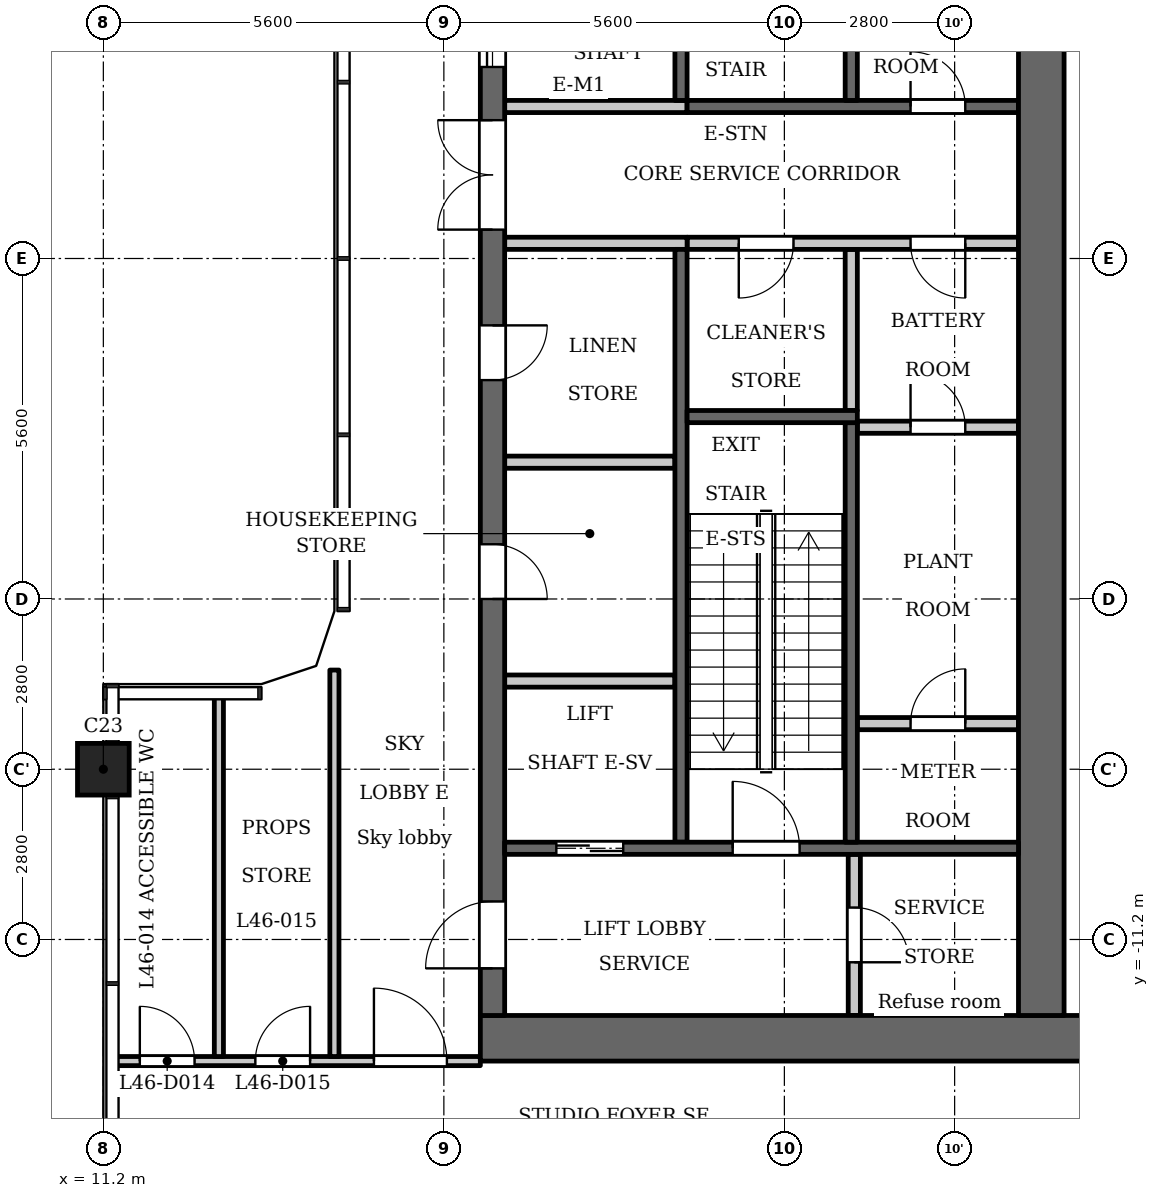
"""IFC4 building model, lengths in metres.
Left out: names, types, materials, properties, quantities, classifications, styles, units other than length and angle.
Written with IfcOpenShell. Run it as: python <this file> out.ifc"""

import sys

from ifc_helpers import new_model, si_unit, direction, frame, frame_2d, origin, origin_2d, place, context, subcontext, project, spatial, polyline, rectangle, outline, extrude, element, fill, save


model = new_model("IFC4")
c1 = context("Model", 3, precision=1e-05, world=origin(), true_north=direction((0.0, 1.0)))
c2 = subcontext(c1, "Body", "Model", "MODEL_VIEW")
j1 = project(units=[si_unit("LENGTHUNIT", "METRE"), si_unit("PLANEANGLEUNIT", "RADIAN")], contexts=[c1])
p1 = place(None, origin())
s1 = spatial("IfcSite", under=j1, at=p1, CompositionType="ELEMENT")
p2 = place(p1, origin())
s2 = spatial("IfcBuilding", under=s1, at=p2, CompositionType="ELEMENT")
p3 = place(p2, frame((0.0, 0.0, 178.1)))
s3 = spatial("IfcBuildingStorey", under=s2, at=p3, CompositionType="ELEMENT", Elevation=178.1)
p4 = place(p3, frame((11.2, -8.4, 0.0), z_axis=(0.0, 0.0, 1.0), x_axis=(1.0, 0.0, 0.0)))
e1 = element("IfcColumn", 1, at=p4, inside=s3, PredefinedType="COLUMN", context=c2, shape_type="SweptSolid", body=[
    extrude(rectangle(XDim=0.85, YDim=0.85, at=origin_2d()), origin(), (0.0, 0.0, 1.0), 5.4),
])
p5 = place(p3, frame((23.5, -2.5, 0.0), z_axis=(0.0, 0.0, 1.0), x_axis=(0.0, 1.0, 0.0)))
e2 = element("IfcWall", 2, at=p5, inside=s3, PredefinedType="PARTITIONING", context=c2, shape_type="SweptSolid", body=[
    extrude(rectangle(XDim=2.65, YDim=0.2, at=frame_2d((1.325, 0.0))), origin(), (0.0, 0.0, 1.0), 4.95),
])
p6 = place(p3, frame((20.7, 2.6, 0.0), z_axis=(0.0, 0.0, 1.0), x_axis=(0.0, 1.0, 0.0)))
e3 = element("IfcWall", 3, at=p6, inside=s3, PredefinedType="SHEAR", context=c2, shape_type="SweptSolid", body=[
    extrude(rectangle(XDim=7.0, YDim=0.2, at=frame_2d((3.5, 0.0))), origin(), (0.0, 0.0, 1.0), 4.95),
])
p7 = place(p3, frame((20.7, -9.6, 0.0), z_axis=(0.0, 0.0, 1.0), x_axis=(0.0, 1.0, 0.0)))
e4 = element("IfcWall", 4, at=p7, inside=s3, PredefinedType="SHEAR", context=c2, shape_type="SweptSolid", body=[
    extrude(rectangle(XDim=9.75, YDim=0.2, at=frame_2d((4.875, 0.0))), origin(), (0.0, 0.0, 1.0), 4.95),
])
p8 = place(p3, frame((20.8, 2.5, 0.0), z_axis=(0.0, 0.0, 1.0), x_axis=(1.0, 0.0, 0.0)))
e5 = element("IfcWall", 5, at=p8, inside=s3, PredefinedType="SHEAR", context=c2, shape_type="SweptSolid", body=[
    extrude(rectangle(XDim=5.45, YDim=0.2, at=frame_2d((2.725, 0.0))), origin(), (0.0, 0.0, 1.0), 4.95),
])
p9 = place(p8, frame((3.675, 0.0, 0.0)))
e6 = element("IfcOpeningElement", 6, at=p9, cuts=e5, PredefinedType="OPENING", context=c2, shape_type="SweptSolid", body=[
    extrude(rectangle(XDim=0.9, YDim=2.1, at=frame_2d((0.45, 1.05))), frame((0.0, 0.11, 0.0), z_axis=(0.0, -1.0, 0.0), x_axis=(1.0, 0.0, 0.0)), (0.0, 0.0, 1.0), 0.22),
])
p10 = place(p3, frame((20.8, 0.25, 0.0), z_axis=(0.0, 0.0, 1.0), x_axis=(1.0, 0.0, 0.0)))
e7 = element("IfcWall", 7, at=p10, inside=s3, PredefinedType="PARTITIONING", context=c2, shape_type="SweptSolid", body=[
    extrude(rectangle(XDim=5.45, YDim=0.2, at=frame_2d((2.725, 0.0))), origin(), (0.0, 0.0, 1.0), 4.95),
])
p11 = place(p10, frame((0.85, 0.0, 0.0)))
e8 = element("IfcOpeningElement", 8, at=p11, cuts=e7, PredefinedType="OPENING", context=c2, shape_type="SweptSolid", body=[
    extrude(rectangle(XDim=0.9, YDim=2.1, at=frame_2d((0.45, 1.05))), frame((0.0, 0.11, 0.0), z_axis=(0.0, -1.0, 0.0), x_axis=(1.0, 0.0, 0.0)), (0.0, 0.0, 1.0), 0.22),
])
p12 = place(p10, frame((3.675, 0.0, 0.0)))
e9 = element("IfcOpeningElement", 9, at=p12, cuts=e7, PredefinedType="OPENING", context=c2, shape_type="SweptSolid", body=[
    extrude(rectangle(XDim=0.9, YDim=2.1, at=frame_2d((0.45, 1.05))), frame((0.0, 0.11, 0.0), z_axis=(0.0, -1.0, 0.0), x_axis=(1.0, 0.0, 0.0)), (0.0, 0.0, 1.0), 0.22),
])
p13 = place(p3, frame((17.4, -12.825, 0.0), z_axis=(0.0, 0.0, 1.0), x_axis=(1.0, 0.0, 0.0)))
e10 = element("IfcWall", 10, at=p13, inside=s3, PredefinedType="SHEAR", context=c2, shape_type="SweptSolid", body=[
    extrude(rectangle(XDim=10.4, YDim=0.75, at=frame_2d((5.2, 0.0))), origin(), (0.0, 0.0, 1.0), 4.95),
])
p14 = place(p3, frame((17.8, -3.35, 0.0), z_axis=(0.0, 0.0, 1.0), x_axis=(1.0, 0.0, 0.0)))
e11 = element("IfcWall", 11, at=p14, inside=s3, PredefinedType="PARTITIONING", context=c2, shape_type="SweptSolid", body=[
    extrude(rectangle(XDim=2.8, YDim=0.2, at=frame_2d((1.4, 0.0))), origin(), (0.0, 0.0, 1.0), 4.95),
])
p15 = place(p3, frame((17.6, -12.45, 0.0), z_axis=(0.0, 0.0, 1.0), x_axis=(0.0, 1.0, 0.0)))
e12 = element("IfcWall", 12, at=p15, inside=s3, PredefinedType="SHEAR", context=c2, shape_type="SweptSolid", body=[
    extrude(rectangle(XDim=24.9, YDim=0.4, at=frame_2d((12.45, 0.0))), origin(), (0.0, 0.0, 1.0), 4.95),
])
p16 = place(p15, frame((6.85, 0.0, 0.0)))
e13 = element("IfcOpeningElement", 13, at=p16, cuts=e12, PredefinedType="OPENING", context=c2, shape_type="SweptSolid", body=[
    extrude(rectangle(XDim=0.9, YDim=2.1, at=frame_2d((0.45, 1.05))), frame((0.0, 0.21, 0.0), z_axis=(0.0, -1.0, 0.0), x_axis=(1.0, 0.0, 0.0)), (0.0, 0.0, 1.0), 0.42),
])
p17 = place(p15, frame((10.45, 0.0, 0.0)))
e14 = element("IfcOpeningElement", 14, at=p17, cuts=e12, PredefinedType="OPENING", context=c2, shape_type="SweptSolid", body=[
    extrude(rectangle(XDim=0.9, YDim=2.1, at=frame_2d((0.45, 1.05))), frame((0.0, 0.21, 0.0), z_axis=(0.0, -1.0, 0.0), x_axis=(1.0, 0.0, 0.0)), (0.0, 0.0, 1.0), 0.42),
])
p18 = place(p15, frame((15.6, 0.0, 0.0)))
e15 = element("IfcOpeningElement", 15, at=p18, cuts=e12, PredefinedType="OPENING", context=c2, shape_type="SweptSolid", body=[
    extrude(rectangle(XDim=1.1, YDim=2.1, at=frame_2d((0.55, 1.05))), frame((0.0, 0.21, 0.0), z_axis=(0.0, -1.0, 0.0), x_axis=(1.0, 0.0, 0.0)), (0.0, 0.0, 1.0), 0.42),
])
p19 = place(p15, frame((18.0, 0.0, 0.0)))
e16 = element("IfcOpeningElement", 16, at=p19, cuts=e12, PredefinedType="OPENING", context=c2, shape_type="SweptSolid", body=[
    extrude(rectangle(XDim=1.1, YDim=2.1, at=frame_2d((0.55, 1.05))), frame((0.0, 0.21, 0.0), z_axis=(0.0, -1.0, 0.0), x_axis=(1.0, 0.0, 0.0)), (0.0, 0.0, 1.0), 0.42),
])
p20 = place(p15, frame((23.025, 0.0, 0.0)))
e17 = element("IfcOpeningElement", 17, at=p20, cuts=e12, PredefinedType="OPENING", context=c2, shape_type="SweptSolid", body=[
    extrude(rectangle(XDim=1.1, YDim=2.1, at=frame_2d((0.55, 1.05))), frame((0.0, 0.21, 0.0), z_axis=(0.0, -1.0, 0.0), x_axis=(1.0, 0.0, 0.0)), (0.0, 0.0, 1.0), 0.42),
])
p21 = place(p15, frame((0.775, 0.0, 0.0)))
e18 = element("IfcOpeningElement", 18, at=p21, cuts=e12, PredefinedType="OPENING", context=c2, shape_type="SweptSolid", body=[
    extrude(rectangle(XDim=1.1, YDim=2.1, at=frame_2d((0.55, 1.05))), frame((0.0, 0.21, 0.0), z_axis=(0.0, -1.0, 0.0), x_axis=(1.0, 0.0, 0.0)), (0.0, 0.0, 1.0), 0.42),
])
p22 = place(p15, frame((12.925, 0.0, 0.0)))
e19 = element("IfcOpeningElement", 19, at=p22, cuts=e12, PredefinedType="OPENING", context=c2, shape_type="SweptSolid", body=[
    extrude(rectangle(XDim=1.8, YDim=2.1, at=frame_2d((0.9, 1.05))), frame((0.0, 0.21, 0.0), z_axis=(0.0, -1.0, 0.0), x_axis=(1.0, 0.0, 0.0)), (0.0, 0.0, 1.0), 0.42),
])
p23 = place(p3, frame((26.625, -12.45, 0.0), z_axis=(0.0, 0.0, 1.0), x_axis=(0.0, 1.0, 0.0)))
e20 = element("IfcWall", 20, at=p23, inside=s3, PredefinedType="SHEAR", context=c2, shape_type="SweptSolid", body=[
    extrude(rectangle(XDim=24.9, YDim=0.75, at=frame_2d((12.45, 0.0))), origin(), (0.0, 0.0, 1.0), 4.95),
])
p24 = place(p3, frame((23.55, -12.45, 0.0), z_axis=(0.0, 0.0, 1.0), x_axis=(0.0, 1.0, 0.0)))
e21 = element("IfcWall", 21, at=p24, inside=s3, PredefinedType="PARTITIONING", context=c2, shape_type="SweptSolid", body=[
    extrude(rectangle(XDim=2.65, YDim=0.2, at=frame_2d((1.325, 0.0))), origin(), (0.0, 0.0, 1.0), 4.95),
])
p25 = place(p24, frame((0.875, 0.0, 0.0)))
e22 = element("IfcOpeningElement", 22, at=p25, cuts=e21, PredefinedType="OPENING", context=c2, shape_type="SweptSolid", body=[
    extrude(rectangle(XDim=0.9, YDim=2.1, at=frame_2d((0.45, 1.05))), frame((0.0, 0.11, 0.0), z_axis=(0.0, -1.0, 0.0), x_axis=(1.0, 0.0, 0.0)), (0.0, 0.0, 1.0), 0.22),
])
p26 = place(p3, frame((23.6, -7.65, 0.0), z_axis=(0.0, 0.0, 1.0), x_axis=(1.0, 0.0, 0.0)))
e23 = element("IfcWall", 23, at=p26, inside=s3, PredefinedType="PARTITIONING", context=c2, shape_type="SweptSolid", body=[
    extrude(rectangle(XDim=2.65, YDim=0.2, at=frame_2d((1.325, 0.0))), origin(), (0.0, 0.0, 1.0), 4.95),
])
p27 = place(p26, frame((0.875, 0.0, 0.0)))
e24 = element("IfcOpeningElement", 24, at=p27, cuts=e23, PredefinedType="OPENING", context=c2, shape_type="SweptSolid", body=[
    extrude(rectangle(XDim=0.9, YDim=2.1, at=frame_2d((0.45, 1.05))), frame((0.0, 0.11, 0.0), z_axis=(0.0, -1.0, 0.0), x_axis=(1.0, 0.0, 0.0)), (0.0, 0.0, 1.0), 0.22),
])
p28 = place(p3, frame((23.6, -2.775, 0.0), z_axis=(0.0, 0.0, 1.0), x_axis=(1.0, 0.0, 0.0)))
e25 = element("IfcWall", 25, at=p28, inside=s3, PredefinedType="PARTITIONING", context=c2, shape_type="SweptSolid", body=[
    extrude(rectangle(XDim=2.65, YDim=0.2, at=frame_2d((1.325, 0.0))), origin(), (0.0, 0.0, 1.0), 4.95),
])
p29 = place(p28, frame((0.875, 0.0, 0.0)))
e26 = element("IfcOpeningElement", 26, at=p29, cuts=e25, PredefinedType="OPENING", context=c2, shape_type="SweptSolid", body=[
    extrude(rectangle(XDim=0.9, YDim=2.1, at=frame_2d((0.45, 1.05))), frame((0.0, 0.11, 0.0), z_axis=(0.0, -1.0, 0.0), x_axis=(1.0, 0.0, 0.0)), (0.0, 0.0, 1.0), 0.22),
])
p30 = place(p3, frame((17.8, -9.7, 0.0), z_axis=(0.0, 0.0, 1.0), x_axis=(1.0, 0.0, 0.0)))
e27 = element("IfcWall", 27, at=p30, inside=s3, PredefinedType="SHEAR", context=c2, shape_type="SweptSolid", body=[
    extrude(rectangle(XDim=8.45, YDim=0.2, at=frame_2d((4.225, 0.0))), origin(), (0.0, 0.0, 1.0), 4.95),
])
p31 = place(p30, frame((0.85, 0.0, 0.0)))
e28 = element("IfcOpeningElement", 28, at=p31, cuts=e27, PredefinedType="OPENING", context=c2, shape_type="SweptSolid", body=[
    extrude(rectangle(XDim=1.1, YDim=2.1, at=frame_2d((0.55, 1.05))), frame((0.0, 0.11, 0.0), z_axis=(0.0, -1.0, 0.0), x_axis=(1.0, 0.0, 0.0)), (0.0, 0.0, 1.0), 0.22),
])
p32 = place(p30, frame((3.75, 0.0, 0.0)))
e29 = element("IfcOpeningElement", 29, at=p32, cuts=e27, PredefinedType="OPENING", context=c2, shape_type="SweptSolid", body=[
    extrude(rectangle(XDim=1.1, YDim=2.1, at=frame_2d((0.55, 1.05))), frame((0.0, 0.11, 0.0), z_axis=(0.0, -1.0, 0.0), x_axis=(1.0, 0.0, 0.0)), (0.0, 0.0, 1.0), 0.22),
])
p33 = place(p3, frame((17.8, -6.95, 0.0), z_axis=(0.0, 0.0, 1.0), x_axis=(1.0, 0.0, 0.0)))
e30 = element("IfcWall", 30, at=p33, inside=s3, PredefinedType="PARTITIONING", context=c2, shape_type="SweptSolid", body=[
    extrude(rectangle(XDim=2.8, YDim=0.2, at=frame_2d((1.4, 0.0))), origin(), (0.0, 0.0, 1.0), 4.95),
])
for number, where, z_axis, x_axis in (
    (31, (17.8, 0.25, 0.0), (0.0, 0.0, 1.0), (1.0, 0.0, 0.0)),
    (32, (17.8, 2.5, 0.0), (0.0, 0.0, 1.0), (1.0, 0.0, 0.0)),
):
    element("IfcWall", number, at=place(p3, frame(where, z_axis=z_axis, x_axis=x_axis)), inside=s3, PredefinedType="PARTITIONING", context=c2, shape_type="SweptSolid", body=[
        extrude(rectangle(XDim=3.0, YDim=0.2, at=frame_2d((1.5, 0.0))), origin(), (0.0, 0.0, 1.0), 4.95),
    ])
p34 = place(p3, frame((23.5, 2.6, 0.0), z_axis=(0.0, 0.0, 1.0), x_axis=(0.0, 1.0, 0.0)))
e33 = element("IfcWall", 33, at=p34, inside=s3, PredefinedType="SHEAR", context=c2, shape_type="SweptSolid", body=[
    extrude(rectangle(XDim=7.0, YDim=0.2, at=frame_2d((3.5, 0.0))), origin(), (0.0, 0.0, 1.0), 4.95),
])
p35 = place(p3, frame((23.5, -9.6, 0.0), z_axis=(0.0, 0.0, 1.0), x_axis=(0.0, 1.0, 0.0)))
e34 = element("IfcWall", 34, at=p35, inside=s3, PredefinedType="SHEAR", context=c2, shape_type="SweptSolid", body=[
    extrude(rectangle(XDim=6.9, YDim=0.2, at=frame_2d((3.45, 0.0))), origin(), (0.0, 0.0, 1.0), 4.95),
])
p36 = place(p3, frame((20.8, -2.6, 0.0), z_axis=(0.0, 0.0, 1.0), x_axis=(1.0, 0.0, 0.0)))
e35 = element("IfcWall", 35, at=p36, inside=s3, PredefinedType="SHEAR", context=c2, shape_type="SweptSolid", body=[
    extrude(rectangle(XDim=2.8, YDim=0.2, at=frame_2d((1.4, 0.0))), origin(), (0.0, 0.0, 1.0), 4.95),
])
p37 = place(p3, frame((11.384, -13.2, 0.0), z_axis=(0.0, 0.0, 1.0), x_axis=(1.0, 0.0, 0.0)))
e36 = element("IfcWall", 36, at=p37, inside=s3, PredefinedType="PARTITIONING", context=c2, shape_type="SweptSolid", body=[
    extrude(rectangle(XDim=6.016, YDim=0.15, at=frame_2d((3.008, 0.0))), origin(), (0.0, 0.0, 1.0), 4.95),
])
p38 = place(p37, frame((4.266, 0.0, 0.0)))
e37 = element("IfcOpeningElement", 37, at=p38, cuts=e36, PredefinedType="OPENING", context=c2, shape_type="SweptSolid", body=[
    extrude(rectangle(XDim=1.2, YDim=2.1, at=frame_2d((0.6, 1.05))), frame((0.0, 0.085, 0.0), z_axis=(0.0, -1.0, 0.0), x_axis=(1.0, 0.0, 0.0)), (0.0, 0.0, 1.0), 0.17),
])
p39 = place(p37, frame((0.416, 0.0, 0.0)))
e38 = element("IfcOpeningElement", 38, at=p39, cuts=e36, PredefinedType="OPENING", context=c2, shape_type="SweptSolid", body=[
    extrude(rectangle(XDim=0.9, YDim=2.1, at=frame_2d((0.45, 1.05))), frame((0.0, 0.085, 0.0), z_axis=(0.0, -1.0, 0.0), x_axis=(1.0, 0.0, 0.0)), (0.0, 0.0, 1.0), 0.17),
])
p40 = place(p37, frame((2.316, 0.0, 0.0)))
e39 = element("IfcOpeningElement", 39, at=p40, cuts=e36, PredefinedType="OPENING", context=c2, shape_type="SweptSolid", body=[
    extrude(rectangle(XDim=0.9, YDim=2.1, at=frame_2d((0.45, 1.05))), frame((0.0, 0.085, 0.0), z_axis=(0.0, -1.0, 0.0), x_axis=(1.0, 0.0, 0.0)), (0.0, 0.0, 1.0), 0.17),
])
p41 = place(p3, frame((13.1, -13.125, 0.0), z_axis=(0.0, 0.0, 1.0), x_axis=(0.0, 1.0, 0.0)))
e40 = element("IfcWall", 40, at=p41, inside=s3, PredefinedType="PARTITIONING", context=c2, shape_type="SweptSolid", body=[
    extrude(rectangle(XDim=5.941, YDim=0.15, at=frame_2d((2.97, 0.0))), origin(), (0.0, 0.0, 1.0), 4.95),
])
p42 = place(p3, frame((15.0, -13.125, 0.0), z_axis=(0.0, 0.0, 1.0), x_axis=(0.0, 1.0, 0.0)))
e41 = element("IfcWall", 41, at=p42, inside=s3, PredefinedType="PARTITIONING", context=c2, shape_type="SweptSolid", body=[
    extrude(rectangle(XDim=6.356, YDim=0.15, at=frame_2d((3.178, 0.0))), origin(), (0.0, 0.0, 1.0), 4.95),
])
p43 = place(p3, origin())
e42 = element("IfcWall", 42, at=p43, inside=s3, PredefinedType="SOLIDWALL", context=c2, shape_type="SweptSolid", body=[
    extrude(outline(polyline([(15.0, -5.8), (14.7, -6.7), (13.8, -7.0), (13.8, -7.3), (13.849, -7.3), (14.937, -6.937), (15.3, -5.849), (15.3, -5.8), (15.0, -5.8)])), origin(), (0.0, 0.0, 1.0), 4.95),
])
p44 = place(p31, origin())
e43 = element("IfcDoor", 43, at=p44, inside=s3, OperationType="DOUBLE_DOOR_SLIDING", PredefinedType="DOOR", context=c2, shape_type="SweptSolid", body=[
    extrude(rectangle(XDim=1.1, YDim=2.1, at=frame_2d((0.55, 1.05))), frame((0.0, 0.025, 0.0), z_axis=(0.0, -1.0, 0.0), x_axis=(1.0, 0.0, 0.0)), (0.0, 0.0, 1.0), 0.05),
])
fill(e28, e43)
p45 = place(p16, origin())
e44 = element("IfcDoor", 44, at=p45, inside=s3, OperationType="SINGLE_SWING_LEFT", PredefinedType="DOOR", context=c2, shape_type="SweptSolid", body=[
    extrude(rectangle(XDim=0.9, YDim=2.1, at=frame_2d((0.45, 1.05))), frame((0.0, 0.025, 0.0), z_axis=(0.0, -1.0, 0.0), x_axis=(1.0, 0.0, 0.0)), (0.0, 0.0, 1.0), 0.05),
])
fill(e13, e44)
p46 = place(p17, origin())
e45 = element("IfcDoor", 45, at=p46, inside=s3, OperationType="SINGLE_SWING_RIGHT", PredefinedType="DOOR", context=c2, shape_type="SweptSolid", body=[
    extrude(rectangle(XDim=0.9, YDim=2.1, at=frame_2d((0.45, 1.05))), frame((0.0, 0.025, 0.0), z_axis=(0.0, -1.0, 0.0), x_axis=(1.0, 0.0, 0.0)), (0.0, 0.0, 1.0), 0.05),
])
fill(e14, e45)
p47 = place(p18, origin())
e46 = element("IfcDoor", 46, at=p47, inside=s3, OperationType="DOUBLE_DOOR_SLIDING", PredefinedType="DOOR", context=c2, shape_type="SweptSolid", body=[
    extrude(rectangle(XDim=1.1, YDim=2.1, at=frame_2d((0.55, 1.05))), frame((0.0, 0.025, 0.0), z_axis=(0.0, -1.0, 0.0), x_axis=(1.0, 0.0, 0.0)), (0.0, 0.0, 1.0), 0.05),
])
fill(e15, e46)
p48 = place(p21, origin())
e47 = element("IfcDoor", 47, at=p48, inside=s3, OperationType="SINGLE_SWING_RIGHT", PredefinedType="DOOR", context=c2, shape_type="SweptSolid", body=[
    extrude(rectangle(XDim=1.1, YDim=2.1, at=frame_2d((0.55, 1.05))), frame((0.0, 0.025, 0.0), z_axis=(0.0, -1.0, 0.0), x_axis=(1.0, 0.0, 0.0)), (0.0, 0.0, 1.0), 0.05),
])
fill(e18, e47)
p49 = place(p25, origin())
e48 = element("IfcDoor", 48, at=p49, inside=s3, OperationType="SINGLE_SWING_LEFT", PredefinedType="DOOR", context=c2, shape_type="SweptSolid", body=[
    extrude(rectangle(XDim=0.9, YDim=2.1, at=frame_2d((0.45, 1.05))), frame((0.0, 0.025, 0.0), z_axis=(0.0, -1.0, 0.0), x_axis=(1.0, 0.0, 0.0)), (0.0, 0.0, 1.0), 0.05),
])
fill(e22, e48)
p50 = place(p32, origin())
e49 = element("IfcDoor", 49, at=p50, inside=s3, OperationType="SINGLE_SWING_RIGHT", PredefinedType="DOOR", context=c2, shape_type="SweptSolid", body=[
    extrude(rectangle(XDim=1.1, YDim=2.1, at=frame_2d((0.55, 1.05))), frame((0.0, 0.025, 0.0), z_axis=(0.0, -1.0, 0.0), x_axis=(1.0, 0.0, 0.0)), (0.0, 0.0, 1.0), 0.05),
])
fill(e29, e49)
p51 = place(p22, origin())
e50 = element("IfcDoor", 50, at=p51, inside=s3, OperationType="DOUBLE_DOOR_SINGLE_SWING", PredefinedType="DOOR", context=c2, shape_type="SweptSolid", body=[
    extrude(rectangle(XDim=1.8, YDim=2.1, at=frame_2d((0.9, 1.05))), frame((0.0, 0.025, 0.0), z_axis=(0.0, -1.0, 0.0), x_axis=(1.0, 0.0, 0.0)), (0.0, 0.0, 1.0), 0.05),
])
fill(e19, e50)
p52 = place(p11, origin())
e51 = element("IfcDoor", 51, at=p52, inside=s3, OperationType="SINGLE_SWING_LEFT", PredefinedType="DOOR", context=c2, shape_type="SweptSolid", body=[
    extrude(rectangle(XDim=0.9, YDim=2.1, at=frame_2d((0.45, 1.05))), frame((0.0, 0.025, 0.0), z_axis=(0.0, -1.0, 0.0), x_axis=(1.0, 0.0, 0.0)), (0.0, 0.0, 1.0), 0.05),
])
fill(e8, e51)
p53 = place(p27, origin())
e52 = element("IfcDoor", 52, at=p53, inside=s3, OperationType="SINGLE_SWING_LEFT", PredefinedType="DOOR", context=c2, shape_type="SweptSolid", body=[
    extrude(rectangle(XDim=0.9, YDim=2.1, at=frame_2d((0.45, 1.05))), frame((0.0, 0.025, 0.0), z_axis=(0.0, -1.0, 0.0), x_axis=(1.0, 0.0, 0.0)), (0.0, 0.0, 1.0), 0.05),
])
fill(e24, e52)
p54 = place(p29, origin())
e53 = element("IfcDoor", 53, at=p54, inside=s3, OperationType="SINGLE_SWING_RIGHT", PredefinedType="DOOR", context=c2, shape_type="SweptSolid", body=[
    extrude(rectangle(XDim=0.9, YDim=2.1, at=frame_2d((0.45, 1.05))), frame((0.0, 0.025, 0.0), z_axis=(0.0, -1.0, 0.0), x_axis=(1.0, 0.0, 0.0)), (0.0, 0.0, 1.0), 0.05),
])
fill(e26, e53)
p55 = place(p12, origin())
e54 = element("IfcDoor", 54, at=p55, inside=s3, OperationType="SINGLE_SWING_RIGHT", PredefinedType="DOOR", context=c2, shape_type="SweptSolid", body=[
    extrude(rectangle(XDim=0.9, YDim=2.1, at=frame_2d((0.45, 1.05))), frame((0.0, 0.025, 0.0), z_axis=(0.0, -1.0, 0.0), x_axis=(1.0, 0.0, 0.0)), (0.0, 0.0, 1.0), 0.05),
])
fill(e9, e54)
p56 = place(p9, origin())
e55 = element("IfcDoor", 55, at=p56, inside=s3, OperationType="SINGLE_SWING_RIGHT", PredefinedType="DOOR", context=c2, shape_type="SweptSolid", body=[
    extrude(rectangle(XDim=0.9, YDim=2.1, at=frame_2d((0.45, 1.05))), frame((0.0, 0.025, 0.0), z_axis=(0.0, -1.0, 0.0), x_axis=(1.0, 0.0, 0.0)), (0.0, 0.0, 1.0), 0.05),
])
fill(e6, e55)
p57 = place(p38, origin())
e56 = element("IfcDoor", 56, at=p57, inside=s3, OperationType="SINGLE_SWING_RIGHT", PredefinedType="DOOR", context=c2, shape_type="SweptSolid", body=[
    extrude(rectangle(XDim=1.2, YDim=2.1, at=frame_2d((0.6, 1.05))), frame((0.0, 0.025, 0.0), z_axis=(0.0, -1.0, 0.0), x_axis=(1.0, 0.0, 0.0)), (0.0, 0.0, 1.0), 0.05),
])
fill(e37, e56)
p58 = place(p39, origin())
e57 = element("IfcDoor", 57, at=p58, inside=s3, OperationType="SINGLE_SWING_RIGHT", PredefinedType="DOOR", context=c2, shape_type="SweptSolid", body=[
    extrude(rectangle(XDim=0.9, YDim=2.1, at=frame_2d((0.45, 1.05))), frame((0.0, 0.025, 0.0), z_axis=(0.0, -1.0, 0.0), x_axis=(1.0, 0.0, 0.0)), (0.0, 0.0, 1.0), 0.05),
])
fill(e38, e57)
p59 = place(p40, origin())
e58 = element("IfcDoor", 58, at=p59, inside=s3, OperationType="SINGLE_SWING_LEFT", PredefinedType="DOOR", context=c2, shape_type="SweptSolid", body=[
    extrude(rectangle(XDim=0.9, YDim=2.1, at=frame_2d((0.45, 1.05))), frame((0.0, 0.025, 0.0), z_axis=(0.0, -1.0, 0.0), x_axis=(1.0, 0.0, 0.0)), (0.0, 0.0, 1.0), 0.05),
])
fill(e39, e58)
save(model, sys.argv[1])
